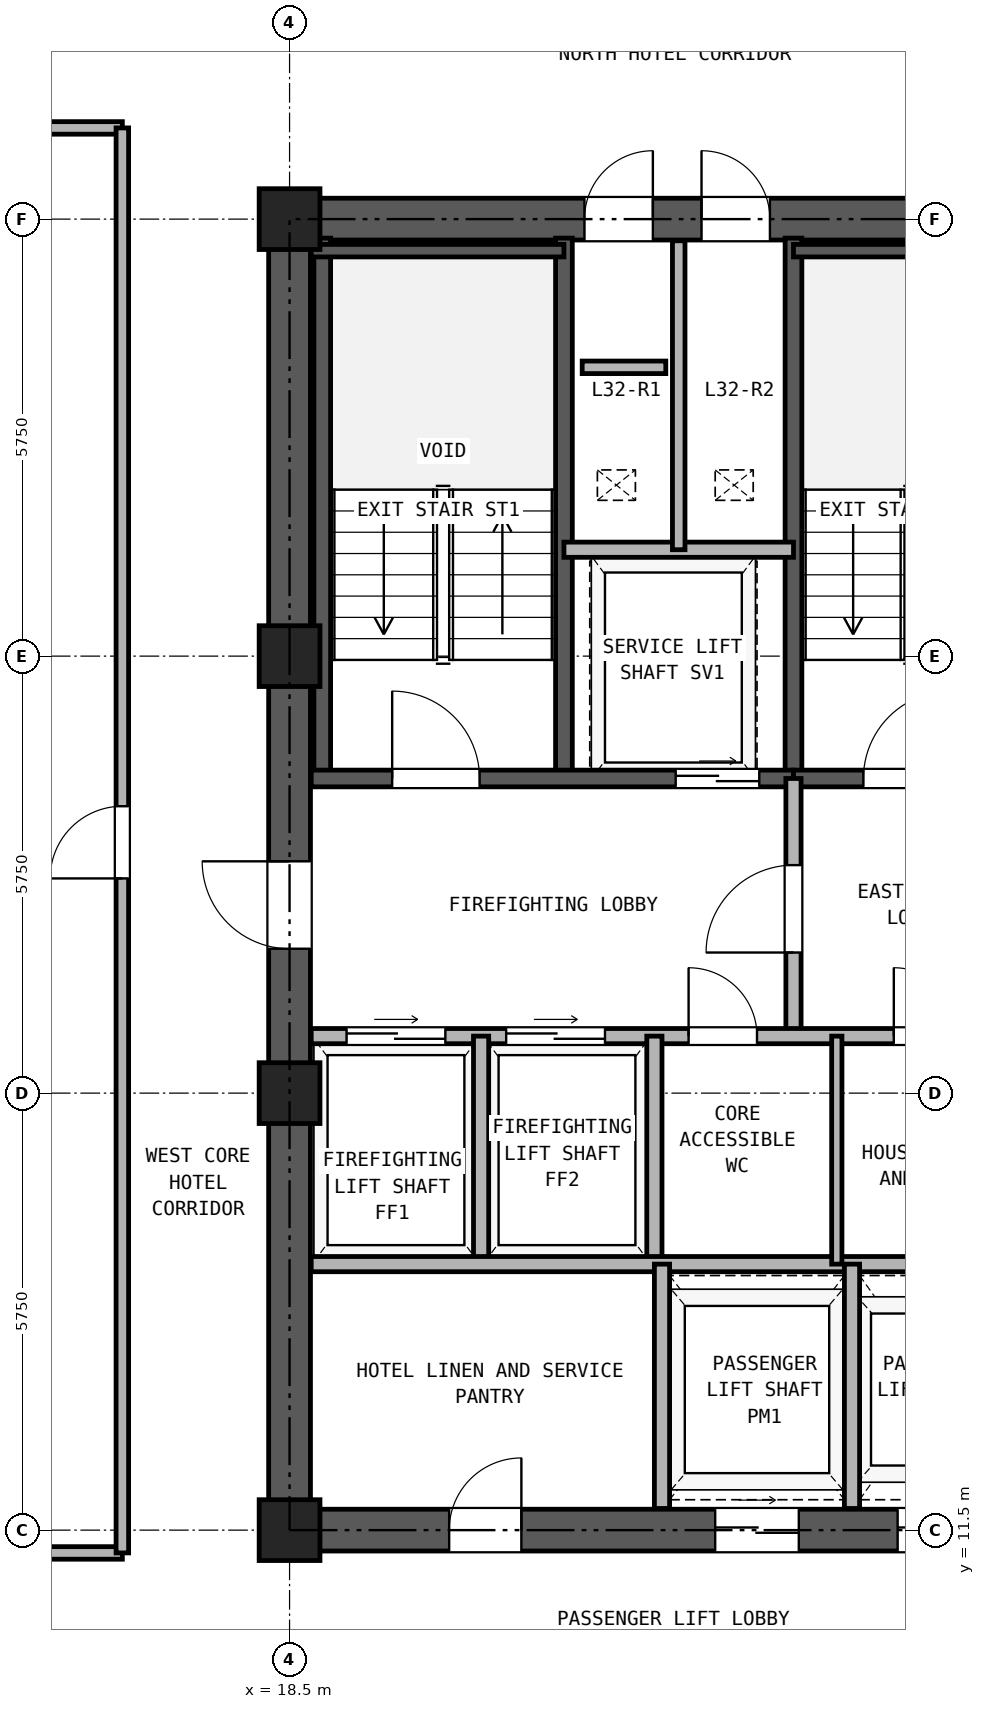
"""IFC4 building model, lengths in metres.
Left out: names, types, materials, properties, quantities, classifications, styles, units other than length and angle.
Written with IfcOpenShell. Run it as: python <this file> out.ifc"""

import sys

from ifc_helpers import new_model, si_unit, direction, frame, frame_2d, origin, origin_2d, place, context, subcontext, project, spatial, rectangle, hollow_rectangle, extrude, source, transform, mapped, element, fill, save


model = new_model("IFC4")
c1 = context("Model", 3, precision=1e-05, world=origin(), true_north=direction((0.0, 1.0)))
c2 = subcontext(c1, "Body", "Model", "MODEL_VIEW")
j1 = project(units=[si_unit("LENGTHUNIT", "METRE"), si_unit("PLANEANGLEUNIT", "RADIAN")], contexts=[c1])
p1 = place(None, origin())
s1 = spatial("IfcSite", under=j1, at=p1, CompositionType="ELEMENT")
p2 = place(p1, origin())
s2 = spatial("IfcBuilding", under=s1, at=p2, CompositionType="ELEMENT")
p3 = place(p2, frame((0.0, 0.0, 118.3)))
s3 = spatial("IfcBuildingStorey", under=s2, at=p3, CompositionType="ELEMENT", Elevation=118.3)
m1 = source(origin(), c2, "Body", "SweptSolid", [
    extrude(hollow_rectangle(XDim=0.8, YDim=0.8, WallThickness=0.045, at=origin_2d()), origin(), (0.0, 0.0, 1.0), 2.95),
])
for number, where, z_axis, x_axis in (
    (1, (18.5, 11.5, 0.0), (0.0, 0.0, 1.0), (1.0, 0.0, 0.0)),
    (2, (18.5, 17.25, 0.0), (0.0, 0.0, 1.0), (1.0, 0.0, 0.0)),
    (3, (18.5, 23.0, 0.0), (0.0, 0.0, 1.0), (1.0, 0.0, 0.0)),
    (4, (18.5, 28.75, 0.0), (0.0, 0.0, 1.0), (1.0, 0.0, 0.0)),
):
    element("IfcColumn", number, at=place(p3, frame(where, z_axis=z_axis, x_axis=x_axis)), inside=s3, PredefinedType="COLUMN", context=c2, shape_type="MappedRepresentation", body=[
        mapped(m1, transform((0.0, 0.0, 0.0), x_axis=(1.0, 0.0, 0.0), y_axis=(0.0, 1.0, 0.0), z_axis=(0.0, 0.0, 1.0), scale=1.0)),
    ])
p4 = place(p3, frame((18.225, 11.5, 0.0), z_axis=(0.0, 0.0, 1.0), x_axis=(1.0, 0.0, 0.0)))
e5 = element("IfcWall", 5, at=p4, inside=s3, PredefinedType="SHEAR", context=c2, shape_type="SweptSolid", body=[
    extrude(rectangle(XDim=10.55, YDim=0.55, at=frame_2d((5.275, 0.0))), origin(), (0.0, 0.0, 1.0), 2.95),
])
p5 = place(p4, frame((2.375, 0.0, 0.0)))
e6 = element("IfcOpeningElement", 6, at=p5, cuts=e5, PredefinedType="OPENING", context=c2, shape_type="SweptSolid", body=[
    extrude(rectangle(XDim=0.95, YDim=2.15, at=frame_2d((0.475, 1.075))), frame((0.0, 0.285, 0.0), z_axis=(0.0, -1.0, 0.0), x_axis=(1.0, 0.0, 0.0)), (0.0, 0.0, 1.0), 0.57),
])
p6 = place(p4, frame((5.875, 0.0, 0.0)))
e7 = element("IfcOpeningElement", 7, at=p6, cuts=e5, PredefinedType="OPENING", context=c2, shape_type="SweptSolid", body=[
    extrude(rectangle(XDim=1.1, YDim=2.25, at=frame_2d((0.55, 1.125))), frame((0.0, 0.285, 0.0), z_axis=(0.0, -1.0, 0.0), x_axis=(1.0, 0.0, 0.0)), (0.0, 0.0, 1.0), 0.57),
])
p7 = place(p4, frame((8.275, 0.0, 0.0)))
e8 = element("IfcOpeningElement", 8, at=p7, cuts=e5, PredefinedType="OPENING", context=c2, shape_type="SweptSolid", body=[
    extrude(rectangle(XDim=1.1, YDim=2.25, at=frame_2d((0.55, 1.125))), frame((0.0, 0.285, 0.0), z_axis=(0.0, -1.0, 0.0), x_axis=(1.0, 0.0, 0.0)), (0.0, 0.0, 1.0), 0.57),
])
p8 = place(p3, frame((18.225, 28.75, 0.0), z_axis=(0.0, 0.0, 1.0), x_axis=(1.0, 0.0, 0.0)))
e9 = element("IfcWall", 9, at=p8, inside=s3, PredefinedType="SHEAR", context=c2, shape_type="SweptSolid", body=[
    extrude(rectangle(XDim=10.55, YDim=0.55, at=frame_2d((5.275, 0.0))), origin(), (0.0, 0.0, 1.0), 2.95),
])
p9 = place(p8, frame((4.155, 0.0, 0.0)))
e10 = element("IfcOpeningElement", 10, at=p9, cuts=e9, PredefinedType="OPENING", context=c2, shape_type="SweptSolid", body=[
    extrude(rectangle(XDim=0.9, YDim=2.05, at=frame_2d((0.45, 1.025))), frame((0.0, 0.285, 0.0), z_axis=(0.0, -1.0, 0.0), x_axis=(1.0, 0.0, 0.0)), (0.0, 0.0, 1.0), 0.57),
])
p10 = place(p8, frame((5.695, 0.0, 0.0)))
e11 = element("IfcOpeningElement", 11, at=p10, cuts=e9, PredefinedType="OPENING", context=c2, shape_type="SweptSolid", body=[
    extrude(rectangle(XDim=0.9, YDim=2.05, at=frame_2d((0.45, 1.025))), frame((0.0, 0.285, 0.0), z_axis=(0.0, -1.0, 0.0), x_axis=(1.0, 0.0, 0.0)), (0.0, 0.0, 1.0), 0.57),
])
p11 = place(p3, frame((18.5, 11.775, 0.0), z_axis=(0.0, 0.0, 1.0), x_axis=(0.0, 1.0, 0.0)))
e12 = element("IfcWall", 12, at=p11, inside=s3, PredefinedType="SHEAR", context=c2, shape_type="SweptSolid", body=[
    extrude(rectangle(XDim=16.7, YDim=0.55, at=frame_2d((8.35, 0.0))), origin(), (0.0, 0.0, 1.0), 2.95),
])
p12 = place(p11, frame((7.375, 0.0, 0.0)))
e13 = element("IfcOpeningElement", 13, at=p12, cuts=e12, PredefinedType="OPENING", context=c2, shape_type="SweptSolid", body=[
    extrude(rectangle(XDim=1.15, YDim=2.2, at=frame_2d((0.575, 1.1))), frame((0.0, 0.285, 0.0), z_axis=(0.0, -1.0, 0.0), x_axis=(1.0, 0.0, 0.0)), (0.0, 0.0, 1.0), 0.57),
])
for number, where, z_axis, x_axis in (
    (14, (18.93, 21.39, 0.0), (0.0, 0.0, 1.0), (0.0, 1.0, 0.0)),
    (15, (22.11, 21.39, 0.0), (0.0, 0.0, 1.0), (0.0, 1.0, 0.0)),
    (16, (25.13, 21.39, 0.0), (0.0, 0.0, 1.0), (0.0, 1.0, 0.0)),
):
    element("IfcWall", number, at=place(p3, frame(where, z_axis=z_axis, x_axis=x_axis)), inside=s3, PredefinedType="SOLIDWALL", context=c2, shape_type="SweptSolid", body=[
        extrude(rectangle(XDim=7.11, YDim=0.22, at=frame_2d((3.555, 0.0))), origin(), (0.0, 0.0, 1.0), 2.95),
    ])
p13 = place(p3, frame((18.785, 28.335, 0.0), z_axis=(0.0, 0.0, 1.0), x_axis=(1.0, 0.0, 0.0)))
e17 = element("IfcWall", 17, at=p13, inside=s3, PredefinedType="PARTITIONING", context=c2, shape_type="SweptSolid", body=[
    extrude(rectangle(XDim=3.325, YDim=0.165, at=frame_2d((1.663, 0.0))), origin(), (0.0, 0.0, 1.0), 2.95),
])
p14 = place(p3, frame((25.13, 28.335, 0.0), z_axis=(0.0, 0.0, 1.0), x_axis=(1.0, 0.0, 0.0)))
e18 = element("IfcWall", 18, at=p14, inside=s3, PredefinedType="PARTITIONING", context=c2, shape_type="SweptSolid", body=[
    extrude(rectangle(XDim=3.085, YDim=0.165, at=frame_2d((1.542, 0.0))), origin(), (0.0, 0.0, 1.0), 2.95),
])
p15 = place(p3, frame((18.785, 21.39, 0.0), z_axis=(0.0, 0.0, 1.0), x_axis=(1.0, 0.0, 0.0)))
e19 = element("IfcWall", 19, at=p15, inside=s3, PredefinedType="SOLIDWALL", context=c2, shape_type="SweptSolid", body=[
    extrude(rectangle(XDim=6.345, YDim=0.22, at=frame_2d((3.172, 0.0))), origin(), (0.0, 0.0, 1.0), 2.95),
])
p16 = place(p15, frame((1.065, 0.0, 0.0)))
e20 = element("IfcOpeningElement", 20, at=p16, cuts=e19, PredefinedType="OPENING", context=c2, shape_type="SweptSolid", body=[
    extrude(rectangle(XDim=1.15, YDim=2.2, at=frame_2d((0.575, 1.1))), frame((0.0, 0.12, 0.0), z_axis=(0.0, -1.0, 0.0), x_axis=(1.0, 0.0, 0.0)), (0.0, 0.0, 1.0), 0.24),
])
p17 = place(p15, frame((4.795, 0.0, 0.0)))
e21 = element("IfcOpeningElement", 21, at=p17, cuts=e19, PredefinedType="OPENING", context=c2, shape_type="SweptSolid", body=[
    extrude(rectangle(XDim=1.1, YDim=2.25, at=frame_2d((0.55, 1.125))), frame((0.0, 0.12, 0.0), z_axis=(0.0, -1.0, 0.0), x_axis=(1.0, 0.0, 0.0)), (0.0, 0.0, 1.0), 0.24),
])
p18 = place(p3, frame((25.13, 21.39, 0.0), z_axis=(0.0, 0.0, 1.0), x_axis=(1.0, 0.0, 0.0)))
e22 = element("IfcWall", 22, at=p18, inside=s3, PredefinedType="SOLIDWALL", context=c2, shape_type="SweptSolid", body=[
    extrude(rectangle(XDim=3.085, YDim=0.22, at=frame_2d((1.542, 0.0))), origin(), (0.0, 0.0, 1.0), 2.95),
])
p19 = place(p18, frame((0.92, 0.0, 0.0)))
e23 = element("IfcOpeningElement", 23, at=p19, cuts=e22, PredefinedType="OPENING", context=c2, shape_type="SweptSolid", body=[
    extrude(rectangle(XDim=1.15, YDim=2.2, at=frame_2d((0.575, 1.1))), frame((0.0, 0.12, 0.0), z_axis=(0.0, -1.0, 0.0), x_axis=(1.0, 0.0, 0.0)), (0.0, 0.0, 1.0), 0.24),
])
p20 = place(p3, frame((22.11, 24.4, 0.0), z_axis=(0.0, 0.0, 1.0), x_axis=(1.0, 0.0, 0.0)))
e24 = element("IfcWall", 24, at=p20, inside=s3, PredefinedType="PARTITIONING", context=c2, shape_type="SweptSolid", body=[
    extrude(rectangle(XDim=3.02, YDim=0.2, at=frame_2d((1.51, 0.0))), origin(), (0.0, 0.0, 1.0), 2.95),
])
p21 = place(p3, frame((23.62, 24.4, 0.0), z_axis=(0.0, 0.0, 1.0), x_axis=(0.0, 1.0, 0.0)))
e25 = element("IfcWall", 25, at=p21, inside=s3, PredefinedType="PARTITIONING", context=c2, shape_type="SweptSolid", body=[
    extrude(rectangle(XDim=4.065, YDim=0.165, at=frame_2d((2.033, 0.0))), origin(), (0.0, 0.0, 1.0), 2.95),
])
p22 = place(p3, frame((25.13, 18.0, 0.0), z_axis=(0.0, 0.0, 1.0), x_axis=(0.0, 1.0, 0.0)))
e26 = element("IfcWall", 26, at=p22, inside=s3, PredefinedType="PARTITIONING", context=c2, shape_type="SweptSolid", body=[
    extrude(rectangle(XDim=3.39, YDim=0.2, at=frame_2d((1.695, 0.0))), origin(), (0.0, 0.0, 1.0), 2.95),
])
p23 = place(p22, frame((1.1, 0.0, 0.0)))
e27 = element("IfcOpeningElement", 27, at=p23, cuts=e26, PredefinedType="OPENING", context=c2, shape_type="SweptSolid", body=[
    extrude(rectangle(XDim=1.15, YDim=2.2, at=frame_2d((0.575, 1.1))), frame((0.0, 0.11, 0.0), z_axis=(0.0, -1.0, 0.0), x_axis=(1.0, 0.0, 0.0)), (0.0, 0.0, 1.0), 0.22),
])
p24 = place(p3, frame((18.785, 18.0, 0.0), z_axis=(0.0, 0.0, 1.0), x_axis=(1.0, 0.0, 0.0)))
e28 = element("IfcWall", 28, at=p24, inside=s3, PredefinedType="PARTITIONING", context=c2, shape_type="SweptSolid", body=[
    extrude(rectangle(XDim=9.43, YDim=0.2, at=frame_2d((4.715, 0.0))), origin(), (0.0, 0.0, 1.0), 2.95),
])
p25 = place(p24, frame((0.465, 0.0, 0.0)))
e29 = element("IfcOpeningElement", 29, at=p25, cuts=e28, PredefinedType="OPENING", context=c2, shape_type="SweptSolid", body=[
    extrude(rectangle(XDim=1.3, YDim=2.3, at=frame_2d((0.65, 1.15))), frame((0.0, 0.11, 0.0), z_axis=(0.0, -1.0, 0.0), x_axis=(1.0, 0.0, 0.0)), (0.0, 0.0, 1.0), 0.22),
])
p26 = place(p24, frame((2.565, 0.0, 0.0)))
e30 = element("IfcOpeningElement", 30, at=p26, cuts=e28, PredefinedType="OPENING", context=c2, shape_type="SweptSolid", body=[
    extrude(rectangle(XDim=1.3, YDim=2.3, at=frame_2d((0.65, 1.15))), frame((0.0, 0.11, 0.0), z_axis=(0.0, -1.0, 0.0), x_axis=(1.0, 0.0, 0.0)), (0.0, 0.0, 1.0), 0.22),
])
p27 = place(p24, frame((4.965, 0.0, 0.0)))
e31 = element("IfcOpeningElement", 31, at=p27, cuts=e28, PredefinedType="OPENING", context=c2, shape_type="SweptSolid", body=[
    extrude(rectangle(XDim=0.9, YDim=2.05, at=frame_2d((0.45, 1.025))), frame((0.0, 0.11, 0.0), z_axis=(0.0, -1.0, 0.0), x_axis=(1.0, 0.0, 0.0)), (0.0, 0.0, 1.0), 0.22),
])
p28 = place(p24, frame((7.665, 0.0, 0.0)))
e32 = element("IfcOpeningElement", 32, at=p28, cuts=e28, PredefinedType="OPENING", context=c2, shape_type="SweptSolid", body=[
    extrude(rectangle(XDim=0.9, YDim=2.05, at=frame_2d((0.45, 1.025))), frame((0.0, 0.11, 0.0), z_axis=(0.0, -1.0, 0.0), x_axis=(1.0, 0.0, 0.0)), (0.0, 0.0, 1.0), 0.22),
])
for number, where, z_axis, x_axis in (
    (33, (21.02, 15.0, 0.0), (0.0, 0.0, 1.0), (0.0, 1.0, 0.0)),
    (34, (23.3, 15.0, 0.0), (0.0, 0.0, 1.0), (0.0, 1.0, 0.0)),
):
    element("IfcWall", number, at=place(p3, frame(where, z_axis=z_axis, x_axis=x_axis)), inside=s3, PredefinedType="PARTITIONING", context=c2, shape_type="SweptSolid", body=[
        extrude(rectangle(XDim=3.0, YDim=0.2, at=frame_2d((1.5, 0.0))), origin(), (0.0, 0.0, 1.0), 2.95),
    ])
p29 = place(p3, frame((18.785, 15.0, 0.0), z_axis=(0.0, 0.0, 1.0), x_axis=(1.0, 0.0, 0.0)))
e35 = element("IfcWall", 35, at=p29, inside=s3, PredefinedType="PARTITIONING", context=c2, shape_type="SweptSolid", body=[
    extrude(rectangle(XDim=9.43, YDim=0.2, at=frame_2d((4.715, 0.0))), origin(), (0.0, 0.0, 1.0), 2.95),
])
p30 = place(p3, frame((25.7, 15.0, 0.0), z_axis=(0.0, 0.0, 1.0), x_axis=(0.0, 1.0, 0.0)))
e36 = element("IfcWall", 36, at=p30, inside=s3, PredefinedType="PARTITIONING", context=c2, shape_type="SweptSolid", body=[
    extrude(rectangle(XDim=3.0, YDim=0.135, at=frame_2d((1.5, 0.0))), origin(), (0.0, 0.0, 1.0), 2.95),
])
for number, where, z_axis, x_axis in (
    (37, (23.4, 11.785, 0.0), (0.0, 0.0, 1.0), (0.0, 1.0, 0.0)),
    (38, (25.9, 11.785, 0.0), (0.0, 0.0, 1.0), (0.0, 1.0, 0.0)),
):
    element("IfcWall", number, at=place(p3, frame(where, z_axis=z_axis, x_axis=x_axis)), inside=s3, PredefinedType="PARTITIONING", context=c2, shape_type="SweptSolid", body=[
        extrude(rectangle(XDim=3.215, YDim=0.2, at=frame_2d((1.607, 0.0))), origin(), (0.0, 0.0, 1.0), 2.95),
    ])
for number, where, z_axis, x_axis in (
    (39, (7.2, 11.2, 0.0), (0.0, 0.0, 1.0), (1.0, 0.0, 0.0)),
    (40, (7.2, 29.95, 0.0), (0.0, 0.0, 1.0), (1.0, 0.0, 0.0)),
):
    element("IfcWall", number, at=place(p3, frame(where, z_axis=z_axis, x_axis=x_axis)), inside=s3, PredefinedType="PARTITIONING", context=c2, shape_type="SweptSolid", body=[
        extrude(rectangle(XDim=9.1, YDim=0.165, at=frame_2d((4.55, 0.0))), origin(), (0.0, 0.0, 1.0), 2.95),
    ])
p31 = place(p3, frame((16.3, 11.2, 0.0), z_axis=(0.0, 0.0, 1.0), x_axis=(0.0, 1.0, 0.0)))
e41 = element("IfcWall", 41, at=p31, inside=s3, PredefinedType="PARTITIONING", context=c2, shape_type="SweptSolid", body=[
    extrude(rectangle(XDim=18.75, YDim=0.165, at=frame_2d((9.375, 0.0))), origin(), (0.0, 0.0, 1.0), 2.95),
])
p32 = place(p31, frame((8.875, 0.0, 0.0)))
e42 = element("IfcOpeningElement", 42, at=p32, cuts=e41, PredefinedType="OPENING", context=c2, shape_type="SweptSolid", body=[
    extrude(rectangle(XDim=0.95, YDim=2.15, at=frame_2d((0.475, 1.075))), frame((0.0, 0.093, 0.0), z_axis=(0.0, -1.0, 0.0), x_axis=(1.0, 0.0, 0.0)), (0.0, 0.0, 1.0), 0.185),
])
p33 = place(p3, frame((22.35, 26.8, 0.0), z_axis=(0.0, 0.0, 1.0), x_axis=(1.0, 0.0, 0.0)))
e43 = element("IfcWall", 43, at=p33, inside=s3, PredefinedType="PARTITIONING", context=c2, shape_type="SweptSolid", body=[
    extrude(rectangle(XDim=1.1, YDim=0.165, at=frame_2d((0.55, 0.0))), origin(), (0.0, 0.0, 1.0), 2.95),
])
p34 = place(p16, frame((1.15, 0.0, 0.0), z_axis=(0.0, 0.0, 1.0), x_axis=(-1.0, 0.0, 0.0)))
e44 = element("IfcDoor", 44, at=p34, inside=s3, OperationType="SINGLE_SWING_LEFT", PredefinedType="DOOR", context=c2, shape_type="SweptSolid", body=[
    extrude(rectangle(XDim=1.15, YDim=2.2, at=frame_2d((0.575, 1.1))), frame((0.0, 0.025, 0.0), z_axis=(0.0, -1.0, 0.0), x_axis=(1.0, 0.0, 0.0)), (0.0, 0.0, 1.0), 0.05),
])
fill(e20, e44)
p35 = place(p19, frame((1.15, 0.0, 0.0), z_axis=(0.0, 0.0, 1.0), x_axis=(-1.0, 0.0, 0.0)))
e45 = element("IfcDoor", 45, at=p35, inside=s3, OperationType="SINGLE_SWING_RIGHT", PredefinedType="DOOR", context=c2, shape_type="SweptSolid", body=[
    extrude(rectangle(XDim=1.15, YDim=2.2, at=frame_2d((0.575, 1.1))), frame((0.0, 0.025, 0.0), z_axis=(0.0, -1.0, 0.0), x_axis=(1.0, 0.0, 0.0)), (0.0, 0.0, 1.0), 0.05),
])
fill(e23, e45)
p36 = place(p17, frame((1.1, 0.0, 0.0), z_axis=(0.0, 0.0, 1.0), x_axis=(-1.0, 0.0, 0.0)))
e46 = element("IfcDoor", 46, at=p36, inside=s3, OperationType="DOUBLE_DOOR_SLIDING", PredefinedType="DOOR", context=c2, shape_type="SweptSolid", body=[
    extrude(rectangle(XDim=1.1, YDim=2.25, at=frame_2d((0.55, 1.125))), frame((0.0, 0.025, 0.0), z_axis=(0.0, -1.0, 0.0), x_axis=(1.0, 0.0, 0.0)), (0.0, 0.0, 1.0), 0.05),
])
fill(e21, e46)
p37 = place(p23, origin())
e47 = element("IfcDoor", 47, at=p37, inside=s3, OperationType="SINGLE_SWING_LEFT", PredefinedType="DOOR", context=c2, shape_type="SweptSolid", body=[
    extrude(rectangle(XDim=1.15, YDim=2.2, at=frame_2d((0.575, 1.1))), frame((0.0, 0.025, 0.0), z_axis=(0.0, -1.0, 0.0), x_axis=(1.0, 0.0, 0.0)), (0.0, 0.0, 1.0), 0.05),
])
fill(e27, e47)
p38 = place(p25, origin())
e48 = element("IfcDoor", 48, at=p38, inside=s3, OperationType="DOUBLE_DOOR_SLIDING", PredefinedType="DOOR", context=c2, shape_type="SweptSolid", body=[
    extrude(rectangle(XDim=1.3, YDim=2.3, at=frame_2d((0.65, 1.15))), frame((0.0, 0.025, 0.0), z_axis=(0.0, -1.0, 0.0), x_axis=(1.0, 0.0, 0.0)), (0.0, 0.0, 1.0), 0.05),
])
fill(e29, e48)
p39 = place(p26, origin())
e49 = element("IfcDoor", 49, at=p39, inside=s3, OperationType="DOUBLE_DOOR_SLIDING", PredefinedType="DOOR", context=c2, shape_type="SweptSolid", body=[
    extrude(rectangle(XDim=1.3, YDim=2.3, at=frame_2d((0.65, 1.15))), frame((0.0, 0.025, 0.0), z_axis=(0.0, -1.0, 0.0), x_axis=(1.0, 0.0, 0.0)), (0.0, 0.0, 1.0), 0.05),
])
fill(e30, e49)
p40 = place(p27, frame((0.9, 0.0, 0.0), z_axis=(0.0, 0.0, 1.0), x_axis=(-1.0, 0.0, 0.0)))
e50 = element("IfcDoor", 50, at=p40, inside=s3, OperationType="SINGLE_SWING_LEFT", PredefinedType="DOOR", context=c2, shape_type="SweptSolid", body=[
    extrude(rectangle(XDim=0.9, YDim=2.05, at=frame_2d((0.45, 1.025))), frame((0.0, 0.025, 0.0), z_axis=(0.0, -1.0, 0.0), x_axis=(1.0, 0.0, 0.0)), (0.0, 0.0, 1.0), 0.05),
])
fill(e31, e50)
p41 = place(p28, frame((0.9, 0.0, 0.0), z_axis=(0.0, 0.0, 1.0), x_axis=(-1.0, 0.0, 0.0)))
e51 = element("IfcDoor", 51, at=p41, inside=s3, OperationType="SINGLE_SWING_LEFT", PredefinedType="DOOR", context=c2, shape_type="SweptSolid", body=[
    extrude(rectangle(XDim=0.9, YDim=2.05, at=frame_2d((0.45, 1.025))), frame((0.0, 0.025, 0.0), z_axis=(0.0, -1.0, 0.0), x_axis=(1.0, 0.0, 0.0)), (0.0, 0.0, 1.0), 0.05),
])
fill(e32, e51)
p42 = place(p12, frame((1.15, 0.0, 0.0), z_axis=(0.0, 0.0, 1.0), x_axis=(-1.0, 0.0, 0.0)))
e52 = element("IfcDoor", 52, at=p42, inside=s3, OperationType="SINGLE_SWING_RIGHT", PredefinedType="DOOR", context=c2, shape_type="SweptSolid", body=[
    extrude(rectangle(XDim=1.15, YDim=2.2, at=frame_2d((0.575, 1.1))), frame((0.0, 0.025, 0.0), z_axis=(0.0, -1.0, 0.0), x_axis=(1.0, 0.0, 0.0)), (0.0, 0.0, 1.0), 0.05),
])
fill(e13, e52)
p43 = place(p9, origin())
e53 = element("IfcDoor", 53, at=p43, inside=s3, OperationType="SINGLE_SWING_RIGHT", PredefinedType="DOOR", context=c2, shape_type="SweptSolid", body=[
    extrude(rectangle(XDim=0.9, YDim=2.05, at=frame_2d((0.45, 1.025))), frame((0.0, 0.025, 0.0), z_axis=(0.0, -1.0, 0.0), x_axis=(1.0, 0.0, 0.0)), (0.0, 0.0, 1.0), 0.05),
])
fill(e10, e53)
p44 = place(p10, origin())
e54 = element("IfcDoor", 54, at=p44, inside=s3, OperationType="SINGLE_SWING_LEFT", PredefinedType="DOOR", context=c2, shape_type="SweptSolid", body=[
    extrude(rectangle(XDim=0.9, YDim=2.05, at=frame_2d((0.45, 1.025))), frame((0.0, 0.025, 0.0), z_axis=(0.0, -1.0, 0.0), x_axis=(1.0, 0.0, 0.0)), (0.0, 0.0, 1.0), 0.05),
])
fill(e11, e54)
p45 = place(p5, frame((0.95, 0.0, 0.0), z_axis=(0.0, 0.0, 1.0), x_axis=(-1.0, 0.0, 0.0)))
e55 = element("IfcDoor", 55, at=p45, inside=s3, OperationType="SINGLE_SWING_RIGHT", PredefinedType="DOOR", context=c2, shape_type="SweptSolid", body=[
    extrude(rectangle(XDim=0.95, YDim=2.15, at=frame_2d((0.475, 1.075))), frame((0.0, 0.025, 0.0), z_axis=(0.0, -1.0, 0.0), x_axis=(1.0, 0.0, 0.0)), (0.0, 0.0, 1.0), 0.05),
])
fill(e6, e55)
p46 = place(p6, frame((1.1, 0.0, 0.0), z_axis=(0.0, 0.0, 1.0), x_axis=(-1.0, 0.0, 0.0)))
e56 = element("IfcDoor", 56, at=p46, inside=s3, OperationType="DOUBLE_DOOR_SLIDING", PredefinedType="DOOR", context=c2, shape_type="SweptSolid", body=[
    extrude(rectangle(XDim=1.1, YDim=2.25, at=frame_2d((0.55, 1.125))), frame((0.0, 0.025, 0.0), z_axis=(0.0, -1.0, 0.0), x_axis=(1.0, 0.0, 0.0)), (0.0, 0.0, 1.0), 0.05),
])
fill(e7, e56)
p47 = place(p7, frame((1.1, 0.0, 0.0), z_axis=(0.0, 0.0, 1.0), x_axis=(-1.0, 0.0, 0.0)))
e57 = element("IfcDoor", 57, at=p47, inside=s3, OperationType="DOUBLE_DOOR_SLIDING", PredefinedType="DOOR", context=c2, shape_type="SweptSolid", body=[
    extrude(rectangle(XDim=1.1, YDim=2.25, at=frame_2d((0.55, 1.125))), frame((0.0, 0.025, 0.0), z_axis=(0.0, -1.0, 0.0), x_axis=(1.0, 0.0, 0.0)), (0.0, 0.0, 1.0), 0.05),
])
fill(e8, e57)
p48 = place(p32, frame((0.95, 0.0, 0.0), z_axis=(0.0, 0.0, 1.0), x_axis=(-1.0, 0.0, 0.0)))
e58 = element("IfcDoor", 58, at=p48, inside=s3, OperationType="SINGLE_SWING_LEFT", PredefinedType="DOOR", context=c2, shape_type="SweptSolid", body=[
    extrude(rectangle(XDim=0.95, YDim=2.15, at=frame_2d((0.475, 1.075))), frame((0.0, 0.025, 0.0), z_axis=(0.0, -1.0, 0.0), x_axis=(1.0, 0.0, 0.0)), (0.0, 0.0, 1.0), 0.05),
])
fill(e42, e58)
save(model, sys.argv[1])
